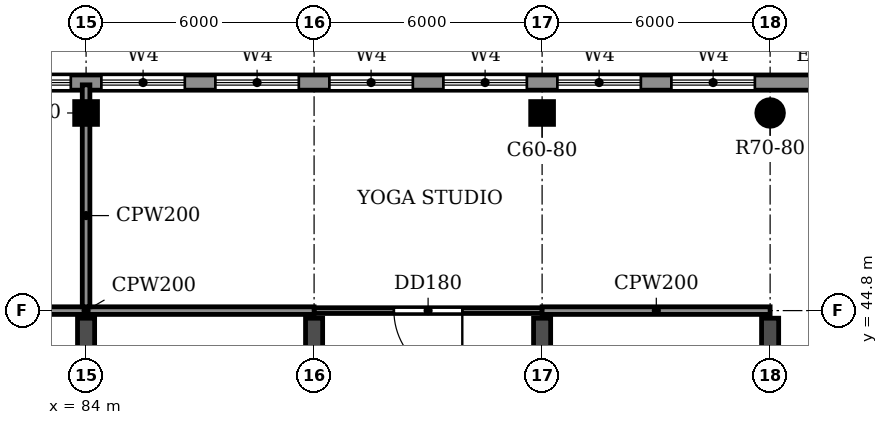
"""IFC4 building model, lengths in metres.
Left out: names, types, materials, properties, quantities, classifications, styles, units other than length and angle.
Written with IfcOpenShell. Run it as: python <this file> out.ifc"""

import sys

from ifc_helpers import new_model, si_unit, direction, frame, frame_2d, origin, origin_2d, place, context, subcontext, project, spatial, rectangle, circle, extrude, source, transform, mapped, element, fill, save


model = new_model("IFC4")
c1 = context("Model", 3, precision=1e-05, world=origin(), true_north=direction((0.0, 1.0)))
c2 = subcontext(c1, "Body", "Model", "MODEL_VIEW")
j1 = project(units=[si_unit("LENGTHUNIT", "METRE"), si_unit("PLANEANGLEUNIT", "RADIAN")], contexts=[c1])
p1 = place(None, origin())
s1 = spatial("IfcSite", under=j1, at=p1, CompositionType="ELEMENT")
p2 = place(p1, origin())
s2 = spatial("IfcBuilding", under=s1, at=p2, CompositionType="ELEMENT")
p3 = place(p2, frame((0.0, 0.0, 19.2)))
s3 = spatial("IfcBuildingStorey", under=s2, at=p3, CompositionType="ELEMENT", Elevation=19.2)
for number, where, z_axis, x_axis in (
    (1, (84.0, 30.55, 0.0), (0.0, 0.0, 1.0), (0.0, 1.0, 0.0)),
    (2, (90.0, 30.55, 0.0), (0.0, 0.0, 1.0), (0.0, 1.0, 0.0)),
    (3, (96.0, 30.55, 0.0), (0.0, 0.0, 1.0), (0.0, 1.0, 0.0)),
    (4, (102.0, 30.55, 0.0), (0.0, 0.0, 1.0), (0.0, 1.0, 0.0)),
):
    element("IfcWall", number, at=place(p3, frame(where, z_axis=z_axis, x_axis=x_axis)), inside=s3, PredefinedType="SHEAR", context=c2, shape_type="SweptSolid", body=[
        extrude(rectangle(XDim=14.05, YDim=0.45, at=frame_2d((7.025, 0.0))), origin(), (0.0, 0.0, 1.0), 3.95),
    ])
m1 = source(origin(), c2, "Body", "SweptSolid", [
    extrude(rectangle(XDim=0.6, YDim=0.6, at=origin_2d()), origin(), (0.0, 0.0, 1.0), 3.95),
])
for number, where, z_axis, x_axis in (
    (5, (84.0, 50.0, 0.0), (0.0, 0.0, 1.0), (1.0, 0.0, 0.0)),
    (6, (96.0, 50.0, 0.0), (0.0, 0.0, 1.0), (1.0, 0.0, 0.0)),
):
    element("IfcColumn", number, at=place(p3, frame(where, z_axis=z_axis, x_axis=x_axis)), inside=s3, PredefinedType="COLUMN", context=c2, shape_type="MappedRepresentation", body=[
        mapped(m1, transform((0.0, 0.0, 0.0))),
    ])
m2 = source(origin(), c2, "Body", "SweptSolid", [
    extrude(circle(Radius=0.35, at=origin_2d()), origin(), (0.0, 0.0, 1.0), 3.95),
])
p4 = place(p3, frame((102.0, 50.0, 0.0), z_axis=(0.0, 0.0, 1.0), x_axis=(1.0, 0.0, 0.0)))
e7 = element("IfcColumn", 7, at=p4, inside=s3, PredefinedType="COLUMN", context=c2, shape_type="MappedRepresentation", body=[
    mapped(m2, transform((0.0, 0.0, 0.0))),
])
p5 = place(p3, frame((105.0, 50.8, 0.0), z_axis=(0.0, 0.0, 1.0), x_axis=(-1.0, 0.0, 0.0)))
e8 = element("IfcWall", 8, at=p5, inside=s3, PredefinedType="STANDARD", context=c2, shape_type="SweptSolid", body=[
    extrude(rectangle(XDim=108.0, YDim=0.4, at=frame_2d((54.0, 0.0))), origin(), (0.0, 0.0, 1.0), 3.95),
])
p6 = place(p5, frame((102.4, 0.0, 0.9)))
e9 = element("IfcOpeningElement", 9, at=p6, cuts=e8, PredefinedType="OPENING", context=c2, shape_type="SweptSolid", body=[
    extrude(rectangle(XDim=2.2, YDim=2.7, at=frame_2d((1.1, 1.35))), frame((0.0, 0.21, 0.0), z_axis=(0.0, -1.0, 0.0), x_axis=(1.0, 0.0, 0.0)), (0.0, 0.0, 1.0), 0.42),
])
p7 = place(p5, frame((99.4, 0.0, 0.9)))
e10 = element("IfcOpeningElement", 10, at=p7, cuts=e8, PredefinedType="OPENING", context=c2, shape_type="SweptSolid", body=[
    extrude(rectangle(XDim=2.2, YDim=2.7, at=frame_2d((1.1, 1.35))), frame((0.0, 0.21, 0.0), z_axis=(0.0, -1.0, 0.0), x_axis=(1.0, 0.0, 0.0)), (0.0, 0.0, 1.0), 0.42),
])
p8 = place(p5, frame((96.4, 0.0, 0.9)))
e11 = element("IfcOpeningElement", 11, at=p8, cuts=e8, PredefinedType="OPENING", context=c2, shape_type="SweptSolid", body=[
    extrude(rectangle(XDim=2.2, YDim=2.7, at=frame_2d((1.1, 1.35))), frame((0.0, 0.21, 0.0), z_axis=(0.0, -1.0, 0.0), x_axis=(1.0, 0.0, 0.0)), (0.0, 0.0, 1.0), 0.42),
])
p9 = place(p5, frame((93.4, 0.0, 0.9)))
e12 = element("IfcOpeningElement", 12, at=p9, cuts=e8, PredefinedType="OPENING", context=c2, shape_type="SweptSolid", body=[
    extrude(rectangle(XDim=2.2, YDim=2.7, at=frame_2d((1.1, 1.35))), frame((0.0, 0.21, 0.0), z_axis=(0.0, -1.0, 0.0), x_axis=(1.0, 0.0, 0.0)), (0.0, 0.0, 1.0), 0.42),
])
p10 = place(p5, frame((90.4, 0.0, 0.9)))
e13 = element("IfcOpeningElement", 13, at=p10, cuts=e8, PredefinedType="OPENING", context=c2, shape_type="SweptSolid", body=[
    extrude(rectangle(XDim=2.2, YDim=2.7, at=frame_2d((1.1, 1.35))), frame((0.0, 0.21, 0.0), z_axis=(0.0, -1.0, 0.0), x_axis=(1.0, 0.0, 0.0)), (0.0, 0.0, 1.0), 0.42),
])
p11 = place(p5, frame((81.4, 0.0, 0.9)))
e14 = element("IfcOpeningElement", 14, at=p11, cuts=e8, PredefinedType="OPENING", context=c2, shape_type="SweptSolid", body=[
    extrude(rectangle(XDim=2.2, YDim=2.7, at=frame_2d((1.1, 1.35))), frame((0.0, 0.21, 0.0), z_axis=(0.0, -1.0, 0.0), x_axis=(1.0, 0.0, 0.0)), (0.0, 0.0, 1.0), 0.42),
])
p12 = place(p5, frame((78.4, 0.0, 0.9)))
e15 = element("IfcOpeningElement", 15, at=p12, cuts=e8, PredefinedType="OPENING", context=c2, shape_type="SweptSolid", body=[
    extrude(rectangle(XDim=2.2, YDim=2.7, at=frame_2d((1.1, 1.35))), frame((0.0, 0.21, 0.0), z_axis=(0.0, -1.0, 0.0), x_axis=(1.0, 0.0, 0.0)), (0.0, 0.0, 1.0), 0.42),
])
p13 = place(p5, frame((75.4, 0.0, 0.9)))
e16 = element("IfcOpeningElement", 16, at=p13, cuts=e8, PredefinedType="OPENING", context=c2, shape_type="SweptSolid", body=[
    extrude(rectangle(XDim=2.2, YDim=2.7, at=frame_2d((1.1, 1.35))), frame((0.0, 0.21, 0.0), z_axis=(0.0, -1.0, 0.0), x_axis=(1.0, 0.0, 0.0)), (0.0, 0.0, 1.0), 0.42),
])
p14 = place(p5, frame((72.4, 0.0, 0.9)))
e17 = element("IfcOpeningElement", 17, at=p14, cuts=e8, PredefinedType="OPENING", context=c2, shape_type="SweptSolid", body=[
    extrude(rectangle(XDim=2.2, YDim=2.7, at=frame_2d((1.1, 1.35))), frame((0.0, 0.21, 0.0), z_axis=(0.0, -1.0, 0.0), x_axis=(1.0, 0.0, 0.0)), (0.0, 0.0, 1.0), 0.42),
])
p15 = place(p5, frame((69.4, 0.0, 0.9)))
e18 = element("IfcOpeningElement", 18, at=p15, cuts=e8, PredefinedType="OPENING", context=c2, shape_type="SweptSolid", body=[
    extrude(rectangle(XDim=2.2, YDim=2.7, at=frame_2d((1.1, 1.35))), frame((0.0, 0.21, 0.0), z_axis=(0.0, -1.0, 0.0), x_axis=(1.0, 0.0, 0.0)), (0.0, 0.0, 1.0), 0.42),
])
p16 = place(p5, frame((66.4, 0.0, 0.9)))
e19 = element("IfcOpeningElement", 19, at=p16, cuts=e8, PredefinedType="OPENING", context=c2, shape_type="SweptSolid", body=[
    extrude(rectangle(XDim=2.2, YDim=2.7, at=frame_2d((1.1, 1.35))), frame((0.0, 0.21, 0.0), z_axis=(0.0, -1.0, 0.0), x_axis=(1.0, 0.0, 0.0)), (0.0, 0.0, 1.0), 0.42),
])
p17 = place(p5, frame((63.4, 0.0, 0.9)))
e20 = element("IfcOpeningElement", 20, at=p17, cuts=e8, PredefinedType="OPENING", context=c2, shape_type="SweptSolid", body=[
    extrude(rectangle(XDim=2.2, YDim=2.7, at=frame_2d((1.1, 1.35))), frame((0.0, 0.21, 0.0), z_axis=(0.0, -1.0, 0.0), x_axis=(1.0, 0.0, 0.0)), (0.0, 0.0, 1.0), 0.42),
])
p18 = place(p5, frame((60.4, 0.0, 0.9)))
e21 = element("IfcOpeningElement", 21, at=p18, cuts=e8, PredefinedType="OPENING", context=c2, shape_type="SweptSolid", body=[
    extrude(rectangle(XDim=2.2, YDim=2.7, at=frame_2d((1.1, 1.35))), frame((0.0, 0.21, 0.0), z_axis=(0.0, -1.0, 0.0), x_axis=(1.0, 0.0, 0.0)), (0.0, 0.0, 1.0), 0.42),
])
p19 = place(p5, frame((57.4, 0.0, 0.9)))
e22 = element("IfcOpeningElement", 22, at=p19, cuts=e8, PredefinedType="OPENING", context=c2, shape_type="SweptSolid", body=[
    extrude(rectangle(XDim=2.2, YDim=2.7, at=frame_2d((1.1, 1.35))), frame((0.0, 0.21, 0.0), z_axis=(0.0, -1.0, 0.0), x_axis=(1.0, 0.0, 0.0)), (0.0, 0.0, 1.0), 0.42),
])
p20 = place(p5, frame((48.4, 0.0, 0.9)))
e23 = element("IfcOpeningElement", 23, at=p20, cuts=e8, PredefinedType="OPENING", context=c2, shape_type="SweptSolid", body=[
    extrude(rectangle(XDim=2.2, YDim=2.7, at=frame_2d((1.1, 1.35))), frame((0.0, 0.21, 0.0), z_axis=(0.0, -1.0, 0.0), x_axis=(1.0, 0.0, 0.0)), (0.0, 0.0, 1.0), 0.42),
])
p21 = place(p5, frame((45.4, 0.0, 0.9)))
e24 = element("IfcOpeningElement", 24, at=p21, cuts=e8, PredefinedType="OPENING", context=c2, shape_type="SweptSolid", body=[
    extrude(rectangle(XDim=2.2, YDim=2.7, at=frame_2d((1.1, 1.35))), frame((0.0, 0.21, 0.0), z_axis=(0.0, -1.0, 0.0), x_axis=(1.0, 0.0, 0.0)), (0.0, 0.0, 1.0), 0.42),
])
p22 = place(p5, frame((42.4, 0.0, 0.9)))
e25 = element("IfcOpeningElement", 25, at=p22, cuts=e8, PredefinedType="OPENING", context=c2, shape_type="SweptSolid", body=[
    extrude(rectangle(XDim=2.2, YDim=2.7, at=frame_2d((1.1, 1.35))), frame((0.0, 0.21, 0.0), z_axis=(0.0, -1.0, 0.0), x_axis=(1.0, 0.0, 0.0)), (0.0, 0.0, 1.0), 0.42),
])
p23 = place(p5, frame((39.4, 0.0, 0.9)))
e26 = element("IfcOpeningElement", 26, at=p23, cuts=e8, PredefinedType="OPENING", context=c2, shape_type="SweptSolid", body=[
    extrude(rectangle(XDim=2.2, YDim=2.7, at=frame_2d((1.1, 1.35))), frame((0.0, 0.21, 0.0), z_axis=(0.0, -1.0, 0.0), x_axis=(1.0, 0.0, 0.0)), (0.0, 0.0, 1.0), 0.42),
])
p24 = place(p5, frame((36.4, 0.0, 0.9)))
e27 = element("IfcOpeningElement", 27, at=p24, cuts=e8, PredefinedType="OPENING", context=c2, shape_type="SweptSolid", body=[
    extrude(rectangle(XDim=2.2, YDim=2.7, at=frame_2d((1.1, 1.35))), frame((0.0, 0.21, 0.0), z_axis=(0.0, -1.0, 0.0), x_axis=(1.0, 0.0, 0.0)), (0.0, 0.0, 1.0), 0.42),
])
p25 = place(p5, frame((33.4, 0.0, 0.9)))
e28 = element("IfcOpeningElement", 28, at=p25, cuts=e8, PredefinedType="OPENING", context=c2, shape_type="SweptSolid", body=[
    extrude(rectangle(XDim=2.2, YDim=2.7, at=frame_2d((1.1, 1.35))), frame((0.0, 0.21, 0.0), z_axis=(0.0, -1.0, 0.0), x_axis=(1.0, 0.0, 0.0)), (0.0, 0.0, 1.0), 0.42),
])
p26 = place(p5, frame((24.4, 0.0, 0.9)))
e29 = element("IfcOpeningElement", 29, at=p26, cuts=e8, PredefinedType="OPENING", context=c2, shape_type="SweptSolid", body=[
    extrude(rectangle(XDim=2.2, YDim=2.7, at=frame_2d((1.1, 1.35))), frame((0.0, 0.21, 0.0), z_axis=(0.0, -1.0, 0.0), x_axis=(1.0, 0.0, 0.0)), (0.0, 0.0, 1.0), 0.42),
])
p27 = place(p5, frame((21.4, 0.0, 0.9)))
e30 = element("IfcOpeningElement", 30, at=p27, cuts=e8, PredefinedType="OPENING", context=c2, shape_type="SweptSolid", body=[
    extrude(rectangle(XDim=2.2, YDim=2.7, at=frame_2d((1.1, 1.35))), frame((0.0, 0.21, 0.0), z_axis=(0.0, -1.0, 0.0), x_axis=(1.0, 0.0, 0.0)), (0.0, 0.0, 1.0), 0.42),
])
p28 = place(p5, frame((18.4, 0.0, 0.9)))
e31 = element("IfcOpeningElement", 31, at=p28, cuts=e8, PredefinedType="OPENING", context=c2, shape_type="SweptSolid", body=[
    extrude(rectangle(XDim=2.2, YDim=2.7, at=frame_2d((1.1, 1.35))), frame((0.0, 0.21, 0.0), z_axis=(0.0, -1.0, 0.0), x_axis=(1.0, 0.0, 0.0)), (0.0, 0.0, 1.0), 0.42),
])
p29 = place(p5, frame((15.4, 0.0, 0.9)))
e32 = element("IfcOpeningElement", 32, at=p29, cuts=e8, PredefinedType="OPENING", context=c2, shape_type="SweptSolid", body=[
    extrude(rectangle(XDim=2.2, YDim=2.7, at=frame_2d((1.1, 1.35))), frame((0.0, 0.21, 0.0), z_axis=(0.0, -1.0, 0.0), x_axis=(1.0, 0.0, 0.0)), (0.0, 0.0, 1.0), 0.42),
])
p30 = place(p5, frame((12.4, 0.0, 0.9)))
e33 = element("IfcOpeningElement", 33, at=p30, cuts=e8, PredefinedType="OPENING", context=c2, shape_type="SweptSolid", body=[
    extrude(rectangle(XDim=2.2, YDim=2.7, at=frame_2d((1.1, 1.35))), frame((0.0, 0.21, 0.0), z_axis=(0.0, -1.0, 0.0), x_axis=(1.0, 0.0, 0.0)), (0.0, 0.0, 1.0), 0.42),
])
p31 = place(p5, frame((9.4, 0.0, 0.9)))
e34 = element("IfcOpeningElement", 34, at=p31, cuts=e8, PredefinedType="OPENING", context=c2, shape_type="SweptSolid", body=[
    extrude(rectangle(XDim=2.2, YDim=2.7, at=frame_2d((1.1, 1.35))), frame((0.0, 0.21, 0.0), z_axis=(0.0, -1.0, 0.0), x_axis=(1.0, 0.0, 0.0)), (0.0, 0.0, 1.0), 0.42),
])
p32 = place(p5, frame((6.4, 0.0, 0.9)))
e35 = element("IfcOpeningElement", 35, at=p32, cuts=e8, PredefinedType="OPENING", context=c2, shape_type="SweptSolid", body=[
    extrude(rectangle(XDim=2.2, YDim=2.7, at=frame_2d((1.1, 1.35))), frame((0.0, 0.21, 0.0), z_axis=(0.0, -1.0, 0.0), x_axis=(1.0, 0.0, 0.0)), (0.0, 0.0, 1.0), 0.42),
])
p33 = place(p5, frame((3.4, 0.0, 0.9)))
e36 = element("IfcOpeningElement", 36, at=p33, cuts=e8, PredefinedType="OPENING", context=c2, shape_type="SweptSolid", body=[
    extrude(rectangle(XDim=2.2, YDim=2.7, at=frame_2d((1.1, 1.35))), frame((0.0, 0.21, 0.0), z_axis=(0.0, -1.0, 0.0), x_axis=(1.0, 0.0, 0.0)), (0.0, 0.0, 1.0), 0.42),
])
p34 = place(p5, frame((86.0, 0.0, 0.0)))
e37 = element("IfcOpeningElement", 37, at=p34, cuts=e8, PredefinedType="OPENING", context=c2, shape_type="SweptSolid", body=[
    extrude(rectangle(XDim=2.0, YDim=2.4, at=frame_2d((1.0, 1.2))), frame((0.0, 0.21, 0.0), z_axis=(0.0, -1.0, 0.0), x_axis=(1.0, 0.0, 0.0)), (0.0, 0.0, 1.0), 0.42),
])
p35 = place(p5, frame((53.0, 0.0, 0.0)))
e38 = element("IfcOpeningElement", 38, at=p35, cuts=e8, PredefinedType="OPENING", context=c2, shape_type="SweptSolid", body=[
    extrude(rectangle(XDim=2.0, YDim=2.4, at=frame_2d((1.0, 1.2))), frame((0.0, 0.21, 0.0), z_axis=(0.0, -1.0, 0.0), x_axis=(1.0, 0.0, 0.0)), (0.0, 0.0, 1.0), 0.42),
])
p36 = place(p5, frame((29.0, 0.0, 0.0)))
e39 = element("IfcOpeningElement", 39, at=p36, cuts=e8, PredefinedType="OPENING", context=c2, shape_type="SweptSolid", body=[
    extrude(rectangle(XDim=2.0, YDim=2.4, at=frame_2d((1.0, 1.2))), frame((0.0, 0.21, 0.0), z_axis=(0.0, -1.0, 0.0), x_axis=(1.0, 0.0, 0.0)), (0.0, 0.0, 1.0), 0.42),
])
p37 = place(p3, frame((90.0, 44.8, 0.0), z_axis=(0.0, 0.0, 1.0), x_axis=(1.0, 0.0, 0.0)))
e40 = element("IfcWall", 40, at=p37, inside=s3, PredefinedType="PARTITIONING", context=c2, shape_type="SweptSolid", body=[
    extrude(rectangle(XDim=6.0, YDim=0.15, at=frame_2d((3.0, 0.0))), origin(), (0.0, 0.0, 1.0), 3.95),
])
p38 = place(p37, frame((2.1, 0.0, 0.0)))
e41 = element("IfcOpeningElement", 41, at=p38, cuts=e40, PredefinedType="OPENING", context=c2, shape_type="SweptSolid", body=[
    extrude(rectangle(XDim=1.8, YDim=2.1, at=frame_2d((0.9, 1.05))), frame((0.0, 0.085, 0.0), z_axis=(0.0, -1.0, 0.0), x_axis=(1.0, 0.0, 0.0)), (0.0, 0.0, 1.0), 0.17),
])
p39 = place(p3, frame((78.0, 44.8, 0.0), z_axis=(0.0, 0.0, 1.0), x_axis=(1.0, 0.0, 0.0)))
e42 = element("IfcWall", 42, at=p39, inside=s3, PredefinedType="PARTITIONING", context=c2, shape_type="SweptSolid", body=[
    extrude(rectangle(XDim=12.0, YDim=0.2, at=frame_2d((6.0, 0.0))), origin(), (0.0, 0.0, 1.0), 3.95),
])
p40 = place(p3, frame((96.0, 44.8, 0.0), z_axis=(0.0, 0.0, 1.0), x_axis=(1.0, 0.0, 0.0)))
e43 = element("IfcWall", 43, at=p40, inside=s3, PredefinedType="PARTITIONING", context=c2, shape_type="SweptSolid", body=[
    extrude(rectangle(XDim=6.0, YDim=0.2, at=frame_2d((3.0, 0.0))), origin(), (0.0, 0.0, 1.0), 3.95),
])
p41 = place(p3, frame((84.0, 44.9, 0.0), z_axis=(0.0, 0.0, 1.0), x_axis=(0.0, 1.0, 0.0)))
e44 = element("IfcWall", 44, at=p41, inside=s3, PredefinedType="PARTITIONING", context=c2, shape_type="SweptSolid", body=[
    extrude(rectangle(XDim=5.84, YDim=0.2, at=frame_2d((2.92, 0.0))), origin(), (0.0, 0.0, 1.0), 3.95),
])
p42 = place(p27, origin())
e45 = element("IfcWindow", 45, at=p42, inside=s3, PartitioningType="DOUBLE_PANEL_HORIZONTAL", PredefinedType="WINDOW", context=c2, shape_type="SweptSolid", body=[
    extrude(rectangle(XDim=2.2, YDim=2.7, at=frame_2d((1.1, 1.35))), frame((0.0, 0.03, 0.0), z_axis=(0.0, -1.0, 0.0), x_axis=(1.0, 0.0, 0.0)), (0.0, 0.0, 1.0), 0.06),
])
fill(e30, e45)
p43 = place(p28, origin())
e46 = element("IfcWindow", 46, at=p43, inside=s3, PartitioningType="DOUBLE_PANEL_HORIZONTAL", PredefinedType="WINDOW", context=c2, shape_type="SweptSolid", body=[
    extrude(rectangle(XDim=2.2, YDim=2.7, at=frame_2d((1.1, 1.35))), frame((0.0, 0.03, 0.0), z_axis=(0.0, -1.0, 0.0), x_axis=(1.0, 0.0, 0.0)), (0.0, 0.0, 1.0), 0.06),
])
fill(e31, e46)
p44 = place(p29, origin())
e47 = element("IfcWindow", 47, at=p44, inside=s3, PartitioningType="DOUBLE_PANEL_HORIZONTAL", PredefinedType="WINDOW", context=c2, shape_type="SweptSolid", body=[
    extrude(rectangle(XDim=2.2, YDim=2.7, at=frame_2d((1.1, 1.35))), frame((0.0, 0.03, 0.0), z_axis=(0.0, -1.0, 0.0), x_axis=(1.0, 0.0, 0.0)), (0.0, 0.0, 1.0), 0.06),
])
fill(e32, e47)
p45 = place(p30, origin())
e48 = element("IfcWindow", 48, at=p45, inside=s3, PartitioningType="DOUBLE_PANEL_HORIZONTAL", PredefinedType="WINDOW", context=c2, shape_type="SweptSolid", body=[
    extrude(rectangle(XDim=2.2, YDim=2.7, at=frame_2d((1.1, 1.35))), frame((0.0, 0.03, 0.0), z_axis=(0.0, -1.0, 0.0), x_axis=(1.0, 0.0, 0.0)), (0.0, 0.0, 1.0), 0.06),
])
fill(e33, e48)
p46 = place(p31, origin())
e49 = element("IfcWindow", 49, at=p46, inside=s3, PartitioningType="DOUBLE_PANEL_HORIZONTAL", PredefinedType="WINDOW", context=c2, shape_type="SweptSolid", body=[
    extrude(rectangle(XDim=2.2, YDim=2.7, at=frame_2d((1.1, 1.35))), frame((0.0, 0.03, 0.0), z_axis=(0.0, -1.0, 0.0), x_axis=(1.0, 0.0, 0.0)), (0.0, 0.0, 1.0), 0.06),
])
fill(e34, e49)
p47 = place(p32, origin())
e50 = element("IfcWindow", 50, at=p47, inside=s3, PartitioningType="DOUBLE_PANEL_HORIZONTAL", PredefinedType="WINDOW", context=c2, shape_type="SweptSolid", body=[
    extrude(rectangle(XDim=2.2, YDim=2.7, at=frame_2d((1.1, 1.35))), frame((0.0, 0.03, 0.0), z_axis=(0.0, -1.0, 0.0), x_axis=(1.0, 0.0, 0.0)), (0.0, 0.0, 1.0), 0.06),
])
fill(e35, e50)
p48 = place(p33, origin())
e51 = element("IfcWindow", 51, at=p48, inside=s3, PartitioningType="DOUBLE_PANEL_HORIZONTAL", PredefinedType="WINDOW", context=c2, shape_type="SweptSolid", body=[
    extrude(rectangle(XDim=2.2, YDim=2.7, at=frame_2d((1.1, 1.35))), frame((0.0, 0.03, 0.0), z_axis=(0.0, -1.0, 0.0), x_axis=(1.0, 0.0, 0.0)), (0.0, 0.0, 1.0), 0.06),
])
fill(e36, e51)
p49 = place(p38, frame((1.8, 0.0, 0.0), z_axis=(0.0, 0.0, 1.0), x_axis=(-1.0, 0.0, 0.0)))
e52 = element("IfcDoor", 52, at=p49, inside=s3, OperationType="DOUBLE_DOOR_SINGLE_SWING", PredefinedType="DOOR", context=c2, shape_type="SweptSolid", body=[
    extrude(rectangle(XDim=1.8, YDim=2.1, at=frame_2d((0.9, 1.05))), frame((0.0, 0.025, 0.0), z_axis=(0.0, -1.0, 0.0), x_axis=(1.0, 0.0, 0.0)), (0.0, 0.0, 1.0), 0.05),
])
fill(e41, e52)
save(model, sys.argv[1])
